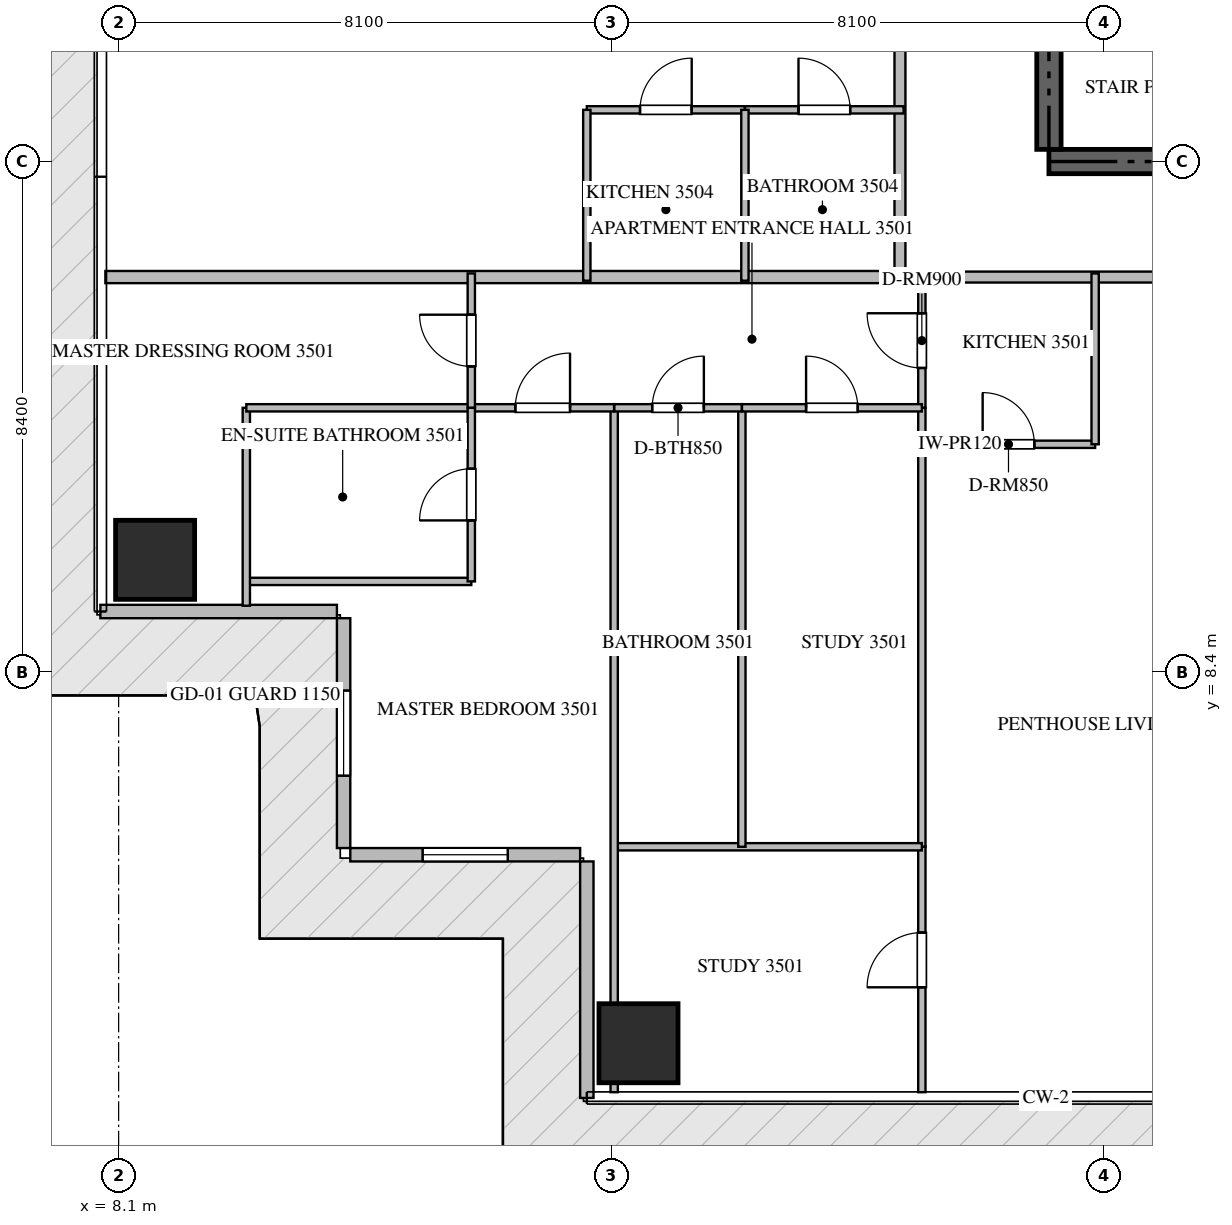
"""IFC4 building model, lengths in metres.
Left out: names, types, materials, properties, quantities, classifications, styles, units other than length and angle.
Written with IfcOpenShell. Run it as: python <this file> out.ifc"""

import sys

from ifc_helpers import new_model, si_unit, direction, frame, frame_2d, origin, origin_2d, place, context, subcontext, project, spatial, rectangle, extrude, source, transform, mapped, element, fill, save


model = new_model("IFC4")
c1 = context("Model", 3, precision=1e-05, world=origin(), true_north=direction((0.0, 1.0)))
c2 = subcontext(c1, "Body", "Model", "MODEL_VIEW")
j1 = project(units=[si_unit("LENGTHUNIT", "METRE"), si_unit("PLANEANGLEUNIT", "RADIAN")], contexts=[c1])
p1 = place(None, origin())
s1 = spatial("IfcSite", under=j1, at=p1, CompositionType="ELEMENT")
p2 = place(p1, origin())
s2 = spatial("IfcBuilding", under=s1, at=p2, CompositionType="ELEMENT")
p3 = place(p2, frame((0.0, 0.0, 142.65)))
s3 = spatial("IfcBuildingStorey", under=s2, at=p3, CompositionType="ELEMENT", Elevation=142.65)
p4 = place(p3, frame((23.4, 16.8, -0.26), z_axis=(0.0, 0.0, 1.0), x_axis=(1.0, 0.0, 0.0)))
e1 = element("IfcWall", 1, at=p4, inside=s3, PredefinedType="SHEAR", context=c2, shape_type="SweptSolid", body=[
    extrude(rectangle(XDim=18.0, YDim=0.4, at=frame_2d((9.0, 0.0))), origin(), (0.0, 0.0, 1.0), 3.748),
])
p5 = place(p3, frame((23.4, 17.0, -0.26), z_axis=(0.0, 0.0, 1.0), x_axis=(0.0, 1.0, 0.0)))
e2 = element("IfcWall", 2, at=p5, inside=s3, PredefinedType="SHEAR", context=c2, shape_type="SweptSolid", body=[
    extrude(rectangle(XDim=4.85, YDim=0.4, at=frame_2d((2.425, 0.0))), origin(), (0.0, 0.0, 1.0), 3.748),
])
m1 = source(origin(), c2, "Body", "SweptSolid", [
    extrude(rectangle(XDim=1.3, YDim=1.3, at=origin_2d()), origin(), (0.0, 0.0, 1.0), 3.75),
])
for number, where, z_axis, x_axis in (
    (3, (16.65, 2.3, -0.26), (0.0, 0.0, 1.0), (1.0, 0.0, 0.0)),
    (4, (8.7, 10.25, -0.26), (0.0, 0.0, 1.0), (1.0, 0.0, 0.0)),
):
    element("IfcColumn", number, at=place(p3, frame(where, z_axis=z_axis, x_axis=x_axis)), inside=s3, PredefinedType="COLUMN", context=c2, shape_type="MappedRepresentation", body=[
        mapped(m1, transform((0.0, 0.0, 0.0), scale=1.0)),
    ])
p6 = place(p3, frame((7.8, 9.4, 0.0), z_axis=(0.0, 0.0, 1.0), x_axis=(1.0, 0.0, 0.0)))
e5 = element("IfcWall", 5, at=p6, inside=s3, PredefinedType="ELEMENTEDWALL", context=c2, shape_type="SweptSolid", body=[
    extrude(rectangle(XDim=3.89, YDim=0.22, at=frame_2d((1.945, 0.0))), origin(), (0.0, 0.0, 1.0), 3.475),
])
p7 = place(p3, frame((11.8, 9.29, 0.0), z_axis=(0.0, 0.0, 1.0), x_axis=(0.0, -1.0, 0.0)))
e6 = element("IfcWall", 6, at=p7, inside=s3, PredefinedType="ELEMENTEDWALL", context=c2, shape_type="SweptSolid", body=[
    extrude(rectangle(XDim=3.78, YDim=0.22, at=frame_2d((1.89, 0.0))), origin(), (0.0, 0.0, 1.0), 3.475),
])
p8 = place(p7, frame((1.19, 0.0, 0.65)))
e7 = element("IfcOpeningElement", 7, at=p8, cuts=e6, PredefinedType="OPENING", context=c2, shape_type="SweptSolid", body=[
    extrude(rectangle(XDim=1.4, YDim=2.05, at=frame_2d((0.7, 1.025))), frame((0.0, 0.12, 0.0), z_axis=(0.0, -1.0, 0.0), x_axis=(1.0, 0.0, 0.0)), (0.0, 0.0, 1.0), 0.24),
])
p9 = place(p3, frame((11.91, 5.4, 0.0), z_axis=(0.0, 0.0, 1.0), x_axis=(1.0, 0.0, 0.0)))
e8 = element("IfcWall", 8, at=p9, inside=s3, PredefinedType="ELEMENTEDWALL", context=c2, shape_type="SweptSolid", body=[
    extrude(rectangle(XDim=3.78, YDim=0.22, at=frame_2d((1.89, 0.0))), origin(), (0.0, 0.0, 1.0), 3.475),
])
p10 = place(p9, frame((1.19, 0.0, 0.65)))
e9 = element("IfcOpeningElement", 9, at=p10, cuts=e8, PredefinedType="OPENING", context=c2, shape_type="SweptSolid", body=[
    extrude(rectangle(XDim=1.4, YDim=2.05, at=frame_2d((0.7, 1.025))), frame((0.0, 0.12, 0.0), z_axis=(0.0, -1.0, 0.0), x_axis=(1.0, 0.0, 0.0)), (0.0, 0.0, 1.0), 0.24),
])
p11 = place(p3, frame((15.8, 5.29, 0.0), z_axis=(0.0, 0.0, 1.0), x_axis=(0.0, -1.0, 0.0)))
e10 = element("IfcWall", 10, at=p11, inside=s3, PredefinedType="ELEMENTEDWALL", context=c2, shape_type="SweptSolid", body=[
    extrude(rectangle(XDim=3.89, YDim=0.22, at=frame_2d((1.945, 0.0))), origin(), (0.0, 0.0, 1.0), 3.475),
])
p12 = place(p3, frame((7.882, 14.9, 0.0), z_axis=(0.0, 0.0, 1.0), x_axis=(1.0, 0.0, 0.0)))
e11 = element("IfcWall", 11, at=p12, inside=s3, PredefinedType="PARTITIONING", context=c2, shape_type="SweptSolid", body=[
    extrude(rectangle(XDim=13.068, YDim=0.2, at=frame_2d((6.534, 0.0))), origin(), (0.0, 0.0, 1.0), 3.49),
])
p13 = place(p3, frame((20.952, 14.9, 0.0), z_axis=(0.0, 0.0, 1.0), x_axis=(1.0, 0.0, 0.0)))
e12 = element("IfcWall", 12, at=p13, inside=s3, PredefinedType="PARTITIONING", context=c2, shape_type="SweptSolid", body=[
    extrude(rectangle(XDim=22.896, YDim=0.18, at=frame_2d((11.448, 0.0))), origin(), (0.0, 0.0, 1.0), 3.49),
])
p14 = place(p13, frame((5.386, 0.0, 0.0)))
e13 = element("IfcOpeningElement", 13, at=p14, cuts=e12, PredefinedType="OPENING", context=c2, shape_type="SweptSolid", body=[
    extrude(rectangle(XDim=1.0, YDim=2.15, at=frame_2d((0.5, 1.075))), frame((0.0, 0.1, 0.0), z_axis=(0.0, -1.0, 0.0), x_axis=(1.0, 0.0, 0.0)), (0.0, 0.0, 1.0), 0.2),
])
p15 = place(p13, frame((10.948, 0.0, 0.0)))
e14 = element("IfcOpeningElement", 14, at=p15, cuts=e12, PredefinedType="OPENING", context=c2, shape_type="SweptSolid", body=[
    extrude(rectangle(XDim=1.0, YDim=2.15, at=frame_2d((0.5, 1.075))), frame((0.0, 0.1, 0.0), z_axis=(0.0, -1.0, 0.0), x_axis=(1.0, 0.0, 0.0)), (0.0, 0.0, 1.0), 0.2),
])
p16 = place(p3, frame((20.95, 14.9, 0.0), z_axis=(0.0, 0.0, 1.0), x_axis=(0.0, 1.0, 0.0)))
e15 = element("IfcWall", 15, at=p16, inside=s3, PredefinedType="PARTITIONING", context=c2, shape_type="SweptSolid", body=[
    extrude(rectangle(XDim=18.7, YDim=0.18, at=frame_2d((9.35, 0.0))), origin(), (0.0, 0.0, 1.0), 3.49),
])
p17 = place(p16, frame((5.328, 0.0, 0.0)))
e16 = element("IfcOpeningElement", 16, at=p17, cuts=e15, PredefinedType="OPENING", context=c2, shape_type="SweptSolid", body=[
    extrude(rectangle(XDim=1.0, YDim=2.15, at=frame_2d((0.5, 1.075))), frame((0.0, 0.1, 0.0), z_axis=(0.0, -1.0, 0.0), x_axis=(1.0, 0.0, 0.0)), (0.0, 0.0, 1.0), 0.2),
])
p18 = place(p16, frame((15.257, 0.0, 0.0)))
e17 = element("IfcOpeningElement", 17, at=p18, cuts=e15, PredefinedType="OPENING", context=c2, shape_type="SweptSolid", body=[
    extrude(rectangle(XDim=1.0, YDim=2.15, at=frame_2d((0.5, 1.075))), frame((0.0, 0.1, 0.0), z_axis=(0.0, -1.0, 0.0), x_axis=(1.0, 0.0, 0.0)), (0.0, 0.0, 1.0), 0.2),
])
p19 = place(p3, frame((21.31, 12.15, 0.0), z_axis=(0.0, 0.0, 1.0), x_axis=(1.0, 0.0, 0.0)))
e18 = element("IfcWall", 18, at=p19, inside=s3, PredefinedType="PARTITIONING", context=c2, shape_type="SweptSolid", body=[
    extrude(rectangle(XDim=2.85, YDim=0.12, at=frame_2d((1.425, 0.0))), origin(), (0.0, 0.0, 1.0), 3.49),
])
p20 = place(p19, frame((1.0, 0.0, 0.0)))
e19 = element("IfcOpeningElement", 19, at=p20, cuts=e18, PredefinedType="OPENING", context=c2, shape_type="SweptSolid", body=[
    extrude(rectangle(XDim=0.85, YDim=2.1, at=frame_2d((0.425, 1.05))), frame((0.0, 0.07, 0.0), z_axis=(0.0, -1.0, 0.0), x_axis=(1.0, 0.0, 0.0)), (0.0, 0.0, 1.0), 0.14),
])
p21 = place(p3, frame((24.16, 12.15, 0.0), z_axis=(0.0, 0.0, 1.0), x_axis=(0.0, 1.0, 0.0)))
e20 = element("IfcWall", 20, at=p21, inside=s3, PredefinedType="PARTITIONING", context=c2, shape_type="SweptSolid", body=[
    extrude(rectangle(XDim=2.81, YDim=0.12, at=frame_2d((1.405, 0.0))), origin(), (0.0, 0.0, 1.0), 3.49),
])
p22 = place(p3, frame((21.31, 12.75, 0.0), z_axis=(0.0, 0.0, 1.0), x_axis=(0.0, 1.0, 0.0)))
e21 = element("IfcWall", 21, at=p22, inside=s3, PredefinedType="PARTITIONING", context=c2, shape_type="SweptSolid", body=[
    extrude(rectangle(XDim=2.21, YDim=0.12, at=frame_2d((1.105, 0.0))), origin(), (0.0, 0.0, 1.0), 3.49),
])
p23 = place(p22, frame((0.655, 0.0, 0.0)))
e22 = element("IfcOpeningElement", 22, at=p23, cuts=e21, PredefinedType="OPENING", context=c2, shape_type="SweptSolid", body=[
    extrude(rectangle(XDim=0.9, YDim=2.1, at=frame_2d((0.45, 1.05))), frame((0.0, 0.07, 0.0), z_axis=(0.0, -1.0, 0.0), x_axis=(1.0, 0.0, 0.0)), (0.0, 0.0, 1.0), 0.14),
])
p24 = place(p3, frame((21.31, 1.495, 0.0), z_axis=(0.0, 0.0, 1.0), x_axis=(0.0, 1.0, 0.0)))
e23 = element("IfcWall", 23, at=p24, inside=s3, PredefinedType="PARTITIONING", context=c2, shape_type="SweptSolid", body=[
    extrude(rectangle(XDim=4.036, YDim=0.12, at=frame_2d((2.018, 0.0))), origin(), (0.0, 0.0, 1.0), 3.49),
])
p25 = place(p24, frame((1.725, 0.0, 0.0)))
e24 = element("IfcOpeningElement", 24, at=p25, cuts=e23, PredefinedType="OPENING", context=c2, shape_type="SweptSolid", body=[
    extrude(rectangle(XDim=0.9, YDim=2.1, at=frame_2d((0.45, 1.05))), frame((0.0, 0.07, 0.0), z_axis=(0.0, -1.0, 0.0), x_axis=(1.0, 0.0, 0.0)), (0.0, 0.0, 1.0), 0.14),
])
p26 = place(p3, frame((21.31, 5.533, 0.0), z_axis=(0.0, 0.0, 1.0), x_axis=(0.0, 1.0, 0.0)))
e25 = element("IfcWall", 25, at=p26, inside=s3, PredefinedType="PARTITIONING", context=c2, shape_type="SweptSolid", body=[
    extrude(rectangle(XDim=7.215, YDim=0.12, at=frame_2d((3.607, 0.0))), origin(), (0.0, 0.0, 1.0), 3.49),
])
p27 = place(p3, frame((16.25, 5.531, 0.0), z_axis=(0.0, 0.0, 1.0), x_axis=(1.0, 0.0, 0.0)))
e26 = element("IfcWall", 26, at=p27, inside=s3, PredefinedType="PARTITIONING", context=c2, shape_type="SweptSolid", body=[
    extrude(rectangle(XDim=5.06, YDim=0.12, at=frame_2d((2.53, 0.0))), origin(), (0.0, 0.0, 1.0), 3.49),
])
p28 = place(p3, frame((16.25, 1.495, 0.0), z_axis=(0.0, 0.0, 1.0), x_axis=(0.0, 1.0, 0.0)))
e27 = element("IfcWall", 27, at=p28, inside=s3, PredefinedType="PARTITIONING", context=c2, shape_type="SweptSolid", body=[
    extrude(rectangle(XDim=11.255, YDim=0.12, at=frame_2d((5.627, 0.0))), origin(), (0.0, 0.0, 1.0), 3.49),
])
p29 = place(p3, frame((18.35, 5.531, 0.0), z_axis=(0.0, 0.0, 1.0), x_axis=(0.0, 1.0, 0.0)))
e28 = element("IfcWall", 28, at=p29, inside=s3, PredefinedType="PARTITIONING", context=c2, shape_type="SweptSolid", body=[
    extrude(rectangle(XDim=7.219, YDim=0.12, at=frame_2d((3.609, 0.0))), origin(), (0.0, 0.0, 1.0), 3.49),
])
p30 = place(p3, frame((16.25, 12.75, 0.0), z_axis=(0.0, 0.0, 1.0), x_axis=(1.0, 0.0, 0.0)))
e29 = element("IfcWall", 29, at=p30, inside=s3, PredefinedType="PARTITIONING", context=c2, shape_type="SweptSolid", body=[
    extrude(rectangle(XDim=2.1, YDim=0.12, at=frame_2d((1.05, 0.0))), origin(), (0.0, 0.0, 1.0), 3.49),
])
p31 = place(p30, frame((0.625, 0.0, 0.0)))
e30 = element("IfcOpeningElement", 30, at=p31, cuts=e29, PredefinedType="OPENING", context=c2, shape_type="SweptSolid", body=[
    extrude(rectangle(XDim=0.85, YDim=2.1, at=frame_2d((0.425, 1.05))), frame((0.0, 0.07, 0.0), z_axis=(0.0, -1.0, 0.0), x_axis=(1.0, 0.0, 0.0)), (0.0, 0.0, 1.0), 0.14),
])
p32 = place(p3, frame((18.352, 12.75, 0.0), z_axis=(0.0, 0.0, 1.0), x_axis=(1.0, 0.0, 0.0)))
e31 = element("IfcWall", 31, at=p32, inside=s3, PredefinedType="PARTITIONING", context=c2, shape_type="SweptSolid", body=[
    extrude(rectangle(XDim=2.958, YDim=0.12, at=frame_2d((1.479, 0.0))), origin(), (0.0, 0.0, 1.0), 3.49),
])
p33 = place(p32, frame((1.054, 0.0, 0.0)))
e32 = element("IfcOpeningElement", 32, at=p33, cuts=e31, PredefinedType="OPENING", context=c2, shape_type="SweptSolid", body=[
    extrude(rectangle(XDim=0.85, YDim=2.1, at=frame_2d((0.425, 1.05))), frame((0.0, 0.07, 0.0), z_axis=(0.0, -1.0, 0.0), x_axis=(1.0, 0.0, 0.0)), (0.0, 0.0, 1.0), 0.14),
])
p34 = place(p3, frame((13.9, 12.75, 0.0), z_axis=(0.0, 0.0, 1.0), x_axis=(1.0, 0.0, 0.0)))
e33 = element("IfcWall", 33, at=p34, inside=s3, PredefinedType="PARTITIONING", context=c2, shape_type="SweptSolid", body=[
    extrude(rectangle(XDim=2.348, YDim=0.12, at=frame_2d((1.174, 0.0))), origin(), (0.0, 0.0, 1.0), 3.49),
])
p35 = place(p34, frame((0.724, 0.0, 0.0)))
e34 = element("IfcOpeningElement", 34, at=p35, cuts=e33, PredefinedType="OPENING", context=c2, shape_type="SweptSolid", body=[
    extrude(rectangle(XDim=0.9, YDim=2.1, at=frame_2d((0.45, 1.05))), frame((0.0, 0.07, 0.0), z_axis=(0.0, -1.0, 0.0), x_axis=(1.0, 0.0, 0.0)), (0.0, 0.0, 1.0), 0.14),
])
p36 = place(p3, frame((10.2, 9.895, 0.0), z_axis=(0.0, 0.0, 1.0), x_axis=(1.0, 0.0, 0.0)))
e35 = element("IfcWall", 35, at=p36, inside=s3, PredefinedType="PARTITIONING", context=c2, shape_type="SweptSolid", body=[
    extrude(rectangle(XDim=3.7, YDim=0.12, at=frame_2d((1.85, 0.0))), origin(), (0.0, 0.0, 1.0), 3.49),
])
p37 = place(p3, frame((10.2, 9.495, 0.0), z_axis=(0.0, 0.0, 1.0), x_axis=(0.0, 1.0, 0.0)))
e36 = element("IfcWall", 36, at=p37, inside=s3, PredefinedType="PARTITIONING", context=c2, shape_type="SweptSolid", body=[
    extrude(rectangle(XDim=3.255, YDim=0.12, at=frame_2d((1.627, 0.0))), origin(), (0.0, 0.0, 1.0), 3.49),
])
p38 = place(p3, frame((10.2, 12.75, 0.0), z_axis=(0.0, 0.0, 1.0), x_axis=(1.0, 0.0, 0.0)))
e37 = element("IfcWall", 37, at=p38, inside=s3, PredefinedType="PARTITIONING", context=c2, shape_type="SweptSolid", body=[
    extrude(rectangle(XDim=3.698, YDim=0.12, at=frame_2d((1.849, 0.0))), origin(), (0.0, 0.0, 1.0), 3.49),
])
p39 = place(p3, frame((13.9, 9.895, 0.0), z_axis=(0.0, 0.0, 1.0), x_axis=(0.0, 1.0, 0.0)))
e38 = element("IfcWall", 38, at=p39, inside=s3, PredefinedType="PARTITIONING", context=c2, shape_type="SweptSolid", body=[
    extrude(rectangle(XDim=2.855, YDim=0.12, at=frame_2d((1.427, 0.0))), origin(), (0.0, 0.0, 1.0), 3.49),
])
p40 = place(p39, frame((1.003, 0.0, 0.0)))
e39 = element("IfcOpeningElement", 39, at=p40, cuts=e38, PredefinedType="OPENING", context=c2, shape_type="SweptSolid", body=[
    extrude(rectangle(XDim=0.85, YDim=2.1, at=frame_2d((0.425, 1.05))), frame((0.0, 0.07, 0.0), z_axis=(0.0, -1.0, 0.0), x_axis=(1.0, 0.0, 0.0)), (0.0, 0.0, 1.0), 0.14),
])
p41 = place(p3, frame((13.9, 12.752, 0.0), z_axis=(0.0, 0.0, 1.0), x_axis=(0.0, 1.0, 0.0)))
e40 = element("IfcWall", 40, at=p41, inside=s3, PredefinedType="PARTITIONING", context=c2, shape_type="SweptSolid", body=[
    extrude(rectangle(XDim=2.208, YDim=0.12, at=frame_2d((1.104, 0.0))), origin(), (0.0, 0.0, 1.0), 3.49),
])
p42 = place(p41, frame((0.679, 0.0, 0.0)))
e41 = element("IfcOpeningElement", 41, at=p42, cuts=e40, PredefinedType="OPENING", context=c2, shape_type="SweptSolid", body=[
    extrude(rectangle(XDim=0.85, YDim=2.1, at=frame_2d((0.425, 1.05))), frame((0.0, 0.07, 0.0), z_axis=(0.0, -1.0, 0.0), x_axis=(1.0, 0.0, 0.0)), (0.0, 0.0, 1.0), 0.14),
])
p43 = place(p3, frame((15.8, 17.65, 0.0), z_axis=(0.0, 0.0, 1.0), x_axis=(1.0, 0.0, 0.0)))
e42 = element("IfcWall", 42, at=p43, inside=s3, PredefinedType="PARTITIONING", context=c2, shape_type="SweptSolid", body=[
    extrude(rectangle(XDim=2.6, YDim=0.12, at=frame_2d((1.3, 0.0))), origin(), (0.0, 0.0, 1.0), 3.49),
])
p44 = place(p43, frame((0.875, 0.0, 0.0)))
e43 = element("IfcOpeningElement", 43, at=p44, cuts=e42, PredefinedType="OPENING", context=c2, shape_type="SweptSolid", body=[
    extrude(rectangle(XDim=0.85, YDim=2.1, at=frame_2d((0.425, 1.05))), frame((0.0, 0.07, 0.0), z_axis=(0.0, -1.0, 0.0), x_axis=(1.0, 0.0, 0.0)), (0.0, 0.0, 1.0), 0.14),
])
p45 = place(p3, frame((18.402, 17.65, 0.0), z_axis=(0.0, 0.0, 1.0), x_axis=(1.0, 0.0, 0.0)))
e44 = element("IfcWall", 44, at=p45, inside=s3, PredefinedType="PARTITIONING", context=c2, shape_type="SweptSolid", body=[
    extrude(rectangle(XDim=2.608, YDim=0.12, at=frame_2d((1.304, 0.0))), origin(), (0.0, 0.0, 1.0), 3.49),
])
p46 = place(p45, frame((0.879, 0.0, 0.0)))
e45 = element("IfcOpeningElement", 45, at=p46, cuts=e44, PredefinedType="OPENING", context=c2, shape_type="SweptSolid", body=[
    extrude(rectangle(XDim=0.85, YDim=2.1, at=frame_2d((0.425, 1.05))), frame((0.0, 0.07, 0.0), z_axis=(0.0, -1.0, 0.0), x_axis=(1.0, 0.0, 0.0)), (0.0, 0.0, 1.0), 0.14),
])
for number, where, z_axis, x_axis in (
    (46, (18.4, 14.84, 0.0), (0.0, 0.0, 1.0), (0.0, 1.0, 0.0)),
    (47, (15.8, 14.84, 0.0), (0.0, 0.0, 1.0), (0.0, 1.0, 0.0)),
):
    element("IfcWall", number, at=place(p3, frame(where, z_axis=z_axis, x_axis=x_axis)), inside=s3, PredefinedType="PARTITIONING", context=c2, shape_type="SweptSolid", body=[
        extrude(rectangle(XDim=2.81, YDim=0.12, at=frame_2d((1.405, 0.0))), origin(), (0.0, 0.0, 1.0), 3.49),
    ])
m2 = source(origin(), c2, "Body", "SweptSolid", [
    extrude(rectangle(XDim=1.4, YDim=2.05, at=frame_2d((0.7, 1.025))), frame((0.0, 0.03, 0.0), z_axis=(0.0, -1.0, 0.0), x_axis=(1.0, 0.0, 0.0)), (0.0, 0.0, 1.0), 0.06),
])
p47 = place(p8, origin())
e48 = element("IfcWindow", 48, at=p47, inside=s3, PartitioningType="SINGLE_PANEL", PredefinedType="WINDOW", context=c2, shape_type="MappedRepresentation", body=[
    mapped(m2, transform((0.0, 0.0, 0.0), scale=1.0)),
])
fill(e7, e48)
p48 = place(p10, origin())
e49 = element("IfcWindow", 49, at=p48, inside=s3, PartitioningType="SINGLE_PANEL", PredefinedType="WINDOW", context=c2, shape_type="MappedRepresentation", body=[
    mapped(m2, transform((0.0, 0.0, 0.0), scale=1.0)),
])
fill(e9, e49)
m3 = source(origin(), c2, "Body", "SweptSolid", [
    extrude(rectangle(XDim=0.85, YDim=2.1, at=frame_2d((0.425, 1.05))), frame((0.0, 0.025, 0.0), z_axis=(0.0, -1.0, 0.0), x_axis=(1.0, 0.0, 0.0)), (0.0, 0.0, 1.0), 0.05),
])
p49 = place(p20, origin())
e50 = element("IfcDoor", 50, at=p49, inside=s3, OperationType="SINGLE_SWING_LEFT", PredefinedType="DOOR", context=c2, shape_type="MappedRepresentation", body=[
    mapped(m3, transform((0.0, 0.0, 0.0), scale=1.0)),
])
fill(e19, e50)
m4 = source(origin(), c2, "Body", "SweptSolid", [
    extrude(rectangle(XDim=0.9, YDim=2.1, at=frame_2d((0.45, 1.05))), frame((0.0, 0.025, 0.0), z_axis=(0.0, -1.0, 0.0), x_axis=(1.0, 0.0, 0.0)), (0.0, 0.0, 1.0), 0.05),
])
p50 = place(p23, origin())
e51 = element("IfcDoor", 51, at=p50, inside=s3, OperationType="SINGLE_SWING_RIGHT", PredefinedType="DOOR", context=c2, shape_type="MappedRepresentation", body=[
    mapped(m4, transform((0.0, 0.0, 0.0), scale=1.0)),
])
fill(e22, e51)
p51 = place(p25, origin())
e52 = element("IfcDoor", 52, at=p51, inside=s3, OperationType="SINGLE_SWING_LEFT", PredefinedType="DOOR", context=c2, shape_type="MappedRepresentation", body=[
    mapped(m4, transform((0.0, 0.0, 0.0), scale=1.0)),
])
fill(e24, e52)
p52 = place(p31, origin())
e53 = element("IfcDoor", 53, at=p52, inside=s3, OperationType="SINGLE_SWING_RIGHT", PredefinedType="DOOR", context=c2, shape_type="MappedRepresentation", body=[
    mapped(m3, transform((0.0, 0.0, 0.0), scale=1.0)),
])
fill(e30, e53)
p53 = place(p33, origin())
e54 = element("IfcDoor", 54, at=p53, inside=s3, OperationType="SINGLE_SWING_LEFT", PredefinedType="DOOR", context=c2, shape_type="MappedRepresentation", body=[
    mapped(m3, transform((0.0, 0.0, 0.0), scale=1.0)),
])
fill(e32, e54)
p54 = place(p35, origin())
e55 = element("IfcDoor", 55, at=p54, inside=s3, OperationType="SINGLE_SWING_RIGHT", PredefinedType="DOOR", context=c2, shape_type="MappedRepresentation", body=[
    mapped(m4, transform((0.0, 0.0, 0.0), scale=1.0)),
])
fill(e34, e55)
p55 = place(p40, origin())
e56 = element("IfcDoor", 56, at=p55, inside=s3, OperationType="SINGLE_SWING_LEFT", PredefinedType="DOOR", context=c2, shape_type="MappedRepresentation", body=[
    mapped(m3, transform((0.0, 0.0, 0.0), scale=1.0)),
])
fill(e39, e56)
p56 = place(p42, origin())
e57 = element("IfcDoor", 57, at=p56, inside=s3, OperationType="SINGLE_SWING_RIGHT", PredefinedType="DOOR", context=c2, shape_type="MappedRepresentation", body=[
    mapped(m3, transform((0.0, 0.0, 0.0), scale=1.0)),
])
fill(e41, e57)
p57 = place(p44, origin())
e58 = element("IfcDoor", 58, at=p57, inside=s3, OperationType="SINGLE_SWING_RIGHT", PredefinedType="DOOR", context=c2, shape_type="MappedRepresentation", body=[
    mapped(m3, transform((0.0, 0.0, 0.0), scale=1.0)),
])
fill(e43, e58)
p58 = place(p46, origin())
e59 = element("IfcDoor", 59, at=p58, inside=s3, OperationType="SINGLE_SWING_LEFT", PredefinedType="DOOR", context=c2, shape_type="MappedRepresentation", body=[
    mapped(m3, transform((0.0, 0.0, 0.0), scale=1.0)),
])
fill(e45, e59)
save(model, sys.argv[1])
